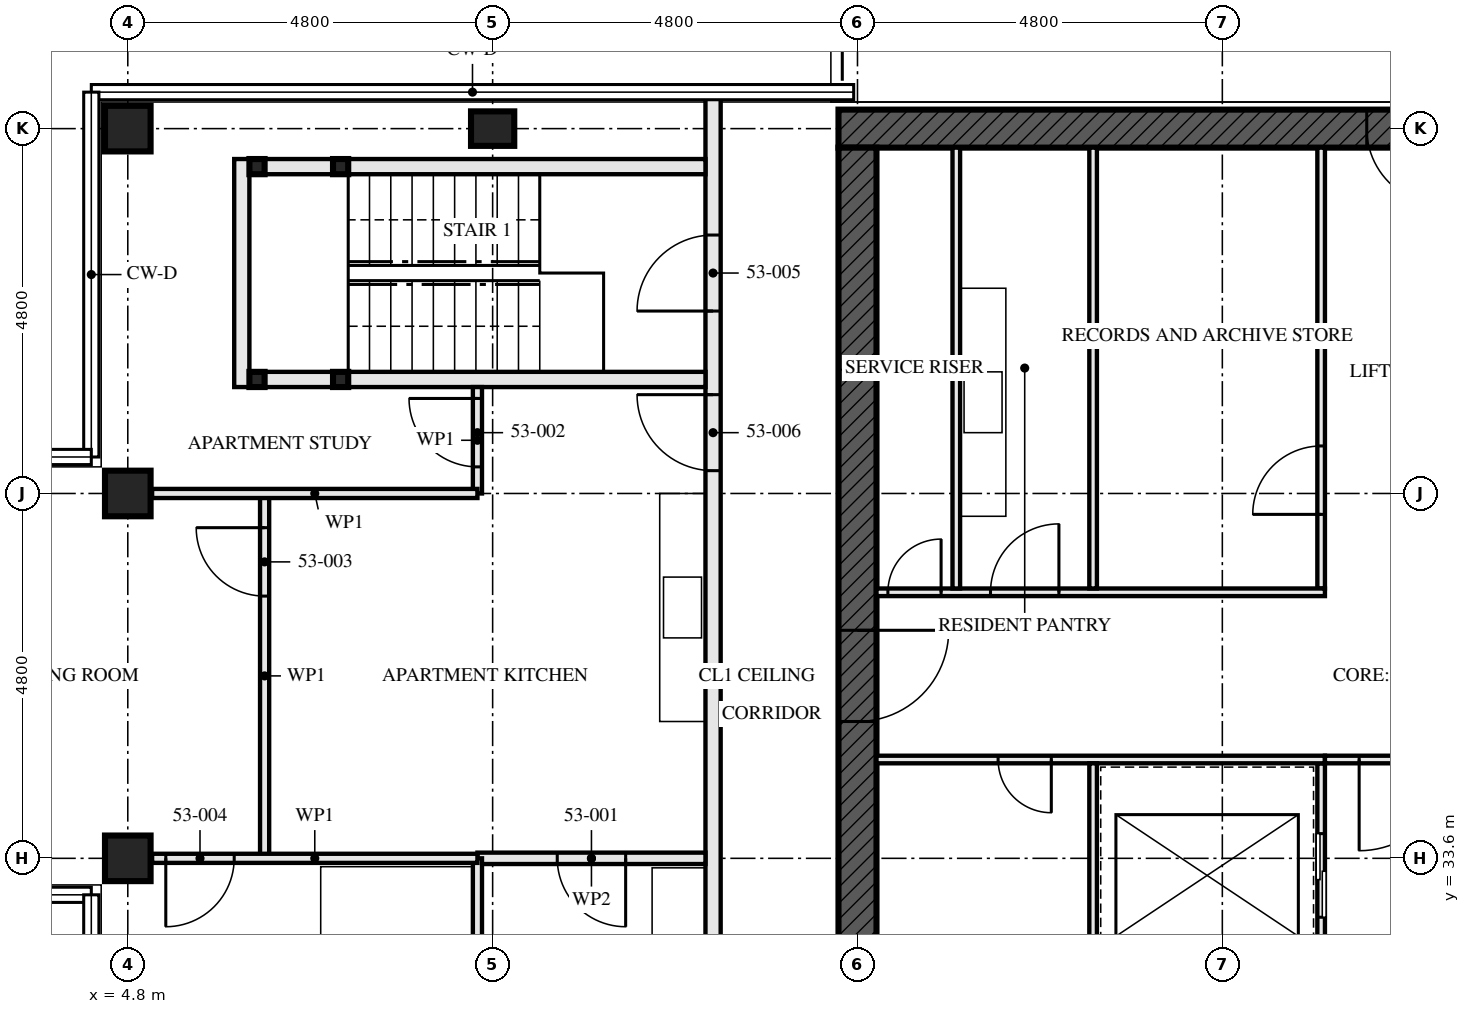
"""IFC4 building model, lengths in metres.
Left out: names, types, materials, properties, quantities, classifications, styles, units other than length and angle.
Written with IfcOpenShell. Run it as: python <this file> out.ifc"""

import sys

from ifc_helpers import new_model, si_unit, direction, frame, frame_2d, origin, origin_2d, place, context, subcontext, project, spatial, rectangle, hollow_rectangle, i_section, extrude, element, fill, save


model = new_model("IFC4")
c1 = context("Model", 3, precision=1e-05, world=origin(), true_north=direction((0.0, 1.0)))
c2 = subcontext(c1, "Body", "Model", "MODEL_VIEW")
j1 = project(units=[si_unit("LENGTHUNIT", "METRE"), si_unit("PLANEANGLEUNIT", "RADIAN")], contexts=[c1])
p1 = place(None, origin())
s1 = spatial("IfcSite", under=j1, at=p1, CompositionType="ELEMENT")
p2 = place(p1, origin())
s2 = spatial("IfcBuilding", under=s1, at=p2, CompositionType="ELEMENT")
p3 = place(p2, frame((0.0, 0.0, 194.5)))
s3 = spatial("IfcBuildingStorey", under=s2, at=p3, CompositionType="ELEMENT", Elevation=194.5)
for number, where, z_axis, x_axis in (
    (1, (4.8, 33.6, 0.0), (0.0, 0.0, 1.0), (0.0, 1.0, 0.0)),
    (2, (4.8, 38.4, 0.0), (0.0, 0.0, 1.0), (0.0, 1.0, 0.0)),
    (3, (4.8, 43.2, 0.0), (0.0, 0.0, 1.0), (0.0, 1.0, 0.0)),
):
    element("IfcColumn", number, at=place(p3, frame(where, z_axis=z_axis, x_axis=x_axis)), inside=s3, PredefinedType="COLUMN", context=c2, shape_type="SweptSolid", body=[
        extrude(hollow_rectangle(XDim=0.6, YDim=0.6, WallThickness=0.05, at=origin_2d()), origin(), (0.0, 0.0, 1.0), 3.5),
    ])
p4 = place(p3, frame((9.6, 43.2, 0.0), z_axis=(0.0, 0.0, 1.0), x_axis=(0.0, 1.0, 0.0)))
e4 = element("IfcColumn", 4, at=p4, inside=s3, PredefinedType="COLUMN", context=c2, shape_type="SweptSolid", body=[
    extrude(i_section(OverallWidth=0.454, OverallDepth=0.569, WebThickness=0.078, FlangeThickness=0.125, FilletRadius=0.015, at=origin_2d()), origin(), (0.0, 0.0, 1.0), 3.5),
])
p5 = place(p3, frame((29.05, 43.2, -0.17), z_axis=(0.0, 0.0, 1.0), x_axis=(-1.0, 0.0, 0.0)))
e5 = element("IfcWall", 5, at=p5, inside=s3, PredefinedType="SHEAR", context=c2, shape_type="SweptSolid", body=[
    extrude(rectangle(XDim=14.9, YDim=0.5, at=frame_2d((7.45, 0.0))), origin(), (0.0, 0.0, 1.0), 3.5),
])
p6 = place(p5, frame((6.95, 0.0, 0.17)))
e6 = element("IfcOpeningElement", 6, at=p6, cuts=e5, PredefinedType="OPENING", context=c2, shape_type="SweptSolid", body=[
    extrude(rectangle(XDim=1.0, YDim=2.4, at=frame_2d((0.5, 1.2))), frame((0.0, 0.26, 0.0), z_axis=(0.0, -1.0, 0.0), x_axis=(1.0, 0.0, 0.0)), (0.0, 0.0, 1.0), 0.521),
])
p7 = place(p3, frame((14.4, 42.95, -0.17), z_axis=(0.0, 0.0, 1.0), x_axis=(0.0, -1.0, 0.0)))
e7 = element("IfcWall", 7, at=p7, inside=s3, PredefinedType="SHEAR", context=c2, shape_type="SweptSolid", body=[
    extrude(rectangle(XDim=13.9, YDim=0.5, at=frame_2d((6.95, 0.0))), origin(), (0.0, 0.0, 1.0), 3.5),
])
p8 = place(p7, frame((6.35, 0.0, 0.17)))
e8 = element("IfcOpeningElement", 8, at=p8, cuts=e7, PredefinedType="OPENING", context=c2, shape_type="SweptSolid", body=[
    extrude(rectangle(XDim=1.2, YDim=2.1, at=frame_2d((0.6, 1.05))), frame((0.0, 0.26, 0.0), z_axis=(0.0, -1.0, 0.0), x_axis=(1.0, 0.0, 0.0)), (0.0, 0.0, 1.0), 0.521),
])
for number, where, z_axis, x_axis in (
    (9, (6.5, 42.7, 0.0), (0.0, 0.0, 1.0), (1.0, 0.0, 0.0)),
    (10, (6.5, 39.9, 0.0), (0.0, 0.0, 1.0), (1.0, 0.0, 0.0)),
    (11, (7.6, 42.7, 0.0), (0.0, 0.0, 1.0), (1.0, 0.0, 0.0)),
    (12, (7.6, 39.9, 0.0), (0.0, 0.0, 1.0), (1.0, 0.0, 0.0)),
):
    element("IfcColumn", number, at=place(p3, frame(where, z_axis=z_axis, x_axis=x_axis)), inside=s3, PredefinedType="COLUMN", context=c2, shape_type="SweptSolid", body=[
        extrude(hollow_rectangle(XDim=0.2, YDim=0.2, WallThickness=0.008, at=origin_2d()), origin(), (0.0, 0.0, 1.0), 3.33),
    ])
p9 = place(p3, frame((6.6, 42.7, 0.0), z_axis=(0.0, 0.0, 1.0), x_axis=(1.0, 0.0, 0.0)))
e13 = element("IfcWall", 13, at=p9, inside=s3, PredefinedType="SOLIDWALL", context=c2, shape_type="SweptSolid", body=[
    extrude(rectangle(XDim=0.9, YDim=0.2, at=frame_2d((0.45, 0.0))), origin(), (0.0, 0.0, 1.0), 2.99),
])
p10 = place(p3, frame((7.7, 42.7, 0.0), z_axis=(0.0, 0.0, 1.0), x_axis=(1.0, 0.0, 0.0)))
e14 = element("IfcWall", 14, at=p10, inside=s3, PredefinedType="SOLIDWALL", context=c2, shape_type="SweptSolid", body=[
    extrude(rectangle(XDim=4.7, YDim=0.2, at=frame_2d((2.35, 0.0))), origin(), (0.0, 0.0, 1.0), 2.99),
])
p11 = place(p3, frame((6.6, 39.9, 0.0), z_axis=(0.0, 0.0, 1.0), x_axis=(1.0, 0.0, 0.0)))
e15 = element("IfcWall", 15, at=p11, inside=s3, PredefinedType="SOLIDWALL", context=c2, shape_type="SweptSolid", body=[
    extrude(rectangle(XDim=0.9, YDim=0.2, at=frame_2d((0.45, 0.0))), origin(), (0.0, 0.0, 1.0), 2.99),
])
p12 = place(p3, frame((7.7, 39.9, 0.0), z_axis=(0.0, 0.0, 1.0), x_axis=(1.0, 0.0, 0.0)))
e16 = element("IfcWall", 16, at=p12, inside=s3, PredefinedType="SOLIDWALL", context=c2, shape_type="SweptSolid", body=[
    extrude(rectangle(XDim=4.7, YDim=0.2, at=frame_2d((2.35, 0.0))), origin(), (0.0, 0.0, 1.0), 2.99),
])
p13 = place(p3, frame((6.3, 42.8, 0.0), z_axis=(0.0, 0.0, 1.0), x_axis=(0.0, -1.0, 0.0)))
e17 = element("IfcWall", 17, at=p13, inside=s3, PredefinedType="SOLIDWALL", context=c2, shape_type="SweptSolid", body=[
    extrude(rectangle(XDim=3.0, YDim=0.2, at=frame_2d((1.5, 0.0))), origin(), (0.0, 0.0, 1.0), 3.33),
])
p14 = place(p3, frame((9.4, 33.6, 0.0), z_axis=(0.0, 0.0, 1.0), x_axis=(1.0, 0.0, 0.0)))
e18 = element("IfcWall", 18, at=p14, inside=s3, PredefinedType="PARTITIONING", context=c2, shape_type="SweptSolid", body=[
    extrude(rectangle(XDim=3.0, YDim=0.15, at=frame_2d((1.5, 0.0))), origin(), (0.0, 0.0, 1.0), 2.55),
])
p15 = place(p14, frame((1.05, 0.0, 0.0)))
e19 = element("IfcOpeningElement", 19, at=p15, cuts=e18, PredefinedType="OPENING", context=c2, shape_type="SweptSolid", body=[
    extrude(rectangle(XDim=0.9, YDim=2.1, at=frame_2d((0.45, 1.05))), frame((0.0, 0.085, 0.0), z_axis=(0.0, -1.0, 0.0), x_axis=(1.0, 0.0, 0.0)), (0.0, 0.0, 1.0), 0.171),
])
p16 = place(p3, frame((9.4, 39.8, 0.0), z_axis=(0.0, 0.0, 1.0), x_axis=(0.0, -1.0, 0.0)))
e20 = element("IfcWall", 20, at=p16, inside=s3, PredefinedType="PARTITIONING", context=c2, shape_type="SweptSolid", body=[
    extrude(rectangle(XDim=1.4, YDim=0.12, at=frame_2d((0.7, 0.0))), origin(), (0.0, 0.0, 1.0), 3.33),
])
p17 = place(p16, frame((0.15, 0.0, 0.0)))
e21 = element("IfcOpeningElement", 21, at=p17, cuts=e20, PredefinedType="OPENING", context=c2, shape_type="SweptSolid", body=[
    extrude(rectangle(XDim=0.9, YDim=2.1, at=frame_2d((0.45, 1.05))), frame((0.0, 0.071, 0.0), z_axis=(0.0, -1.0, 0.0), x_axis=(1.0, 0.0, 0.0)), (0.0, 0.0, 1.0), 0.141),
])
p18 = place(p3, frame((6.6, 38.4, 0.0), z_axis=(0.0, 0.0, 1.0), x_axis=(0.0, -1.0, 0.0)))
e22 = element("IfcWall", 22, at=p18, inside=s3, PredefinedType="PARTITIONING", context=c2, shape_type="SweptSolid", body=[
    extrude(rectangle(XDim=4.8, YDim=0.12, at=frame_2d((2.4, 0.0))), origin(), (0.0, 0.0, 1.0), 3.33),
])
p19 = place(p18, frame((0.45, 0.0, 0.0)))
e23 = element("IfcOpeningElement", 23, at=p19, cuts=e22, PredefinedType="OPENING", context=c2, shape_type="SweptSolid", body=[
    extrude(rectangle(XDim=0.9, YDim=2.1, at=frame_2d((0.45, 1.05))), frame((0.0, 0.071, 0.0), z_axis=(0.0, -1.0, 0.0), x_axis=(1.0, 0.0, 0.0)), (0.0, 0.0, 1.0), 0.141),
])
p20 = place(p3, frame((9.4, 33.6, 0.0), z_axis=(0.0, 0.0, 1.0), x_axis=(0.0, -1.0, 0.0)))
e24 = element("IfcWall", 24, at=p20, inside=s3, PredefinedType="PARTITIONING", context=c2, shape_type="SweptSolid", body=[
    extrude(rectangle(XDim=4.553, YDim=0.12, at=frame_2d((2.276, 0.0))), origin(), (0.0, 0.0, 1.0), 3.33),
])
p21 = place(p3, frame((5.12, 38.4, 0.0), z_axis=(0.0, 0.0, 1.0), x_axis=(1.0, 0.0, 0.0)))
e25 = element("IfcWall", 25, at=p21, inside=s3, PredefinedType="PARTITIONING", context=c2, shape_type="SweptSolid", body=[
    extrude(rectangle(XDim=4.28, YDim=0.12, at=frame_2d((2.14, 0.0))), origin(), (0.0, 0.0, 1.0), 2.55),
])
p22 = place(p3, frame((5.12, 33.6, 0.0), z_axis=(0.0, 0.0, 1.0), x_axis=(1.0, 0.0, 0.0)))
e26 = element("IfcWall", 26, at=p22, inside=s3, PredefinedType="PARTITIONING", context=c2, shape_type="SweptSolid", body=[
    extrude(rectangle(XDim=4.28, YDim=0.12, at=frame_2d((2.14, 0.0))), origin(), (0.0, 0.0, 1.0), 2.55),
])
p23 = place(p22, frame((0.18, 0.0, 0.0)))
e27 = element("IfcOpeningElement", 27, at=p23, cuts=e26, PredefinedType="OPENING", context=c2, shape_type="SweptSolid", body=[
    extrude(rectangle(XDim=0.9, YDim=2.1, at=frame_2d((0.45, 1.05))), frame((0.0, 0.071, 0.0), z_axis=(0.0, -1.0, 0.0), x_axis=(1.0, 0.0, 0.0)), (0.0, 0.0, 1.0), 0.141),
])
p24 = place(p3, frame((12.5, 43.655, 0.0), z_axis=(0.0, 0.0, 1.0), x_axis=(0.0, -1.0, 0.0)))
e28 = element("IfcWall", 28, at=p24, inside=s3, PredefinedType="PARTITIONING", context=c2, shape_type="SweptSolid", body=[
    extrude(rectangle(XDim=15.31, YDim=0.2, at=frame_2d((7.655, 0.0))), origin(), (0.0, 0.0, 1.0), 2.32),
])
p25 = place(p24, frame((1.855, 0.0, 0.0)))
e29 = element("IfcOpeningElement", 29, at=p25, cuts=e28, PredefinedType="OPENING", context=c2, shape_type="SweptSolid", body=[
    extrude(rectangle(XDim=1.0, YDim=2.1, at=frame_2d((0.5, 1.05))), frame((0.0, 0.111, 0.0), z_axis=(0.0, -1.0, 0.0), x_axis=(1.0, 0.0, 0.0)), (0.0, 0.0, 1.0), 0.221),
])
p26 = place(p24, frame((3.955, 0.0, 0.0)))
e30 = element("IfcOpeningElement", 30, at=p26, cuts=e28, PredefinedType="OPENING", context=c2, shape_type="SweptSolid", body=[
    extrude(rectangle(XDim=1.0, YDim=2.1, at=frame_2d((0.5, 1.05))), frame((0.0, 0.111, 0.0), z_axis=(0.0, -1.0, 0.0), x_axis=(1.0, 0.0, 0.0)), (0.0, 0.0, 1.0), 0.221),
])
p27 = place(p3, frame((15.7, 37.15, 0.0), z_axis=(0.0, 0.0, 1.0), x_axis=(0.0, 1.0, 0.0)))
e31 = element("IfcWall", 31, at=p27, inside=s3, PredefinedType="SOLIDWALL", context=c2, shape_type="SweptSolid", body=[
    extrude(rectangle(XDim=5.8, YDim=0.1, at=frame_2d((2.9, 0.0))), origin(), (0.0, 0.0, 1.0), 3.33),
])
p28 = place(p3, frame((20.5, 29.05, 0.0), z_axis=(0.0, 0.0, 1.0), x_axis=(0.0, 1.0, 0.0)))
e32 = element("IfcWall", 32, at=p28, inside=s3, PredefinedType="SOLIDWALL", context=c2, shape_type="SweptSolid", body=[
    extrude(rectangle(XDim=5.8, YDim=0.1, at=frame_2d((2.9, 0.0))), origin(), (0.0, 0.0, 1.0), 3.33),
])
p29 = place(p28, frame((0.8, 0.0, 0.0)))
e33 = element("IfcOpeningElement", 33, at=p29, cuts=e32, PredefinedType="OPENING", context=c2, shape_type="SweptSolid", body=[
    extrude(rectangle(XDim=1.1, YDim=2.3, at=frame_2d((0.55, 1.15))), frame((0.0, 0.061, 0.0), z_axis=(0.0, -1.0, 0.0), x_axis=(1.0, 0.0, 0.0)), (0.0, 0.0, 1.0), 0.121),
])
p30 = place(p28, frame((3.775, 0.0, 0.0)))
e34 = element("IfcOpeningElement", 34, at=p30, cuts=e32, PredefinedType="OPENING", context=c2, shape_type="SweptSolid", body=[
    extrude(rectangle(XDim=1.1, YDim=2.3, at=frame_2d((0.55, 1.15))), frame((0.0, 0.061, 0.0), z_axis=(0.0, -1.0, 0.0), x_axis=(1.0, 0.0, 0.0)), (0.0, 0.0, 1.0), 0.121),
])
p31 = place(p3, frame((20.5, 37.15, 0.0), z_axis=(0.0, 0.0, 1.0), x_axis=(0.0, 1.0, 0.0)))
e35 = element("IfcWall", 35, at=p31, inside=s3, PredefinedType="SOLIDWALL", context=c2, shape_type="SweptSolid", body=[
    extrude(rectangle(XDim=5.8, YDim=0.1, at=frame_2d((2.9, 0.0))), origin(), (0.0, 0.0, 1.0), 3.33),
])
p32 = place(p31, frame((0.975, 0.0, 0.0)))
e36 = element("IfcOpeningElement", 36, at=p32, cuts=e35, PredefinedType="OPENING", context=c2, shape_type="SweptSolid", body=[
    extrude(rectangle(XDim=0.9, YDim=2.1, at=frame_2d((0.45, 1.05))), frame((0.0, 0.061, 0.0), z_axis=(0.0, -1.0, 0.0), x_axis=(1.0, 0.0, 0.0)), (0.0, 0.0, 1.0), 0.121),
])
p33 = place(p3, frame((14.65, 34.9, 0.0), z_axis=(0.0, 0.0, 1.0), x_axis=(1.0, 0.0, 0.0)))
e37 = element("IfcWall", 37, at=p33, inside=s3, PredefinedType="SOLIDWALL", context=c2, shape_type="SweptSolid", body=[
    extrude(rectangle(XDim=5.9, YDim=0.1, at=frame_2d((2.95, 0.0))), origin(), (0.0, 0.0, 1.0), 3.33),
])
p34 = place(p33, frame((1.6, 0.0, 0.0)))
e38 = element("IfcOpeningElement", 38, at=p34, cuts=e37, PredefinedType="OPENING", context=c2, shape_type="SweptSolid", body=[
    extrude(rectangle(XDim=0.7, YDim=2.1, at=frame_2d((0.35, 1.05))), frame((0.0, 0.061, 0.0), z_axis=(0.0, -1.0, 0.0), x_axis=(1.0, 0.0, 0.0)), (0.0, 0.0, 1.0), 0.121),
])
p35 = place(p3, frame((14.65, 37.1, 0.0), z_axis=(0.0, 0.0, 1.0), x_axis=(1.0, 0.0, 0.0)))
e39 = element("IfcWall", 39, at=p35, inside=s3, PredefinedType="SOLIDWALL", context=c2, shape_type="SweptSolid", body=[
    extrude(rectangle(XDim=5.9, YDim=0.1, at=frame_2d((2.95, 0.0))), origin(), (0.0, 0.0, 1.0), 3.33),
])
p36 = place(p35, frame((0.15, 0.0, 0.0)))
e40 = element("IfcOpeningElement", 40, at=p36, cuts=e39, PredefinedType="OPENING", context=c2, shape_type="SweptSolid", body=[
    extrude(rectangle(XDim=0.7, YDim=2.1, at=frame_2d((0.35, 1.05))), frame((0.0, 0.061, 0.0), z_axis=(0.0, -1.0, 0.0), x_axis=(1.0, 0.0, 0.0)), (0.0, 0.0, 1.0), 0.121),
])
p37 = place(p35, frame((1.5, 0.0, 0.0)))
e41 = element("IfcOpeningElement", 41, at=p37, cuts=e39, PredefinedType="OPENING", context=c2, shape_type="SweptSolid", body=[
    extrude(rectangle(XDim=0.9, YDim=2.1, at=frame_2d((0.45, 1.05))), frame((0.0, 0.061, 0.0), z_axis=(0.0, -1.0, 0.0), x_axis=(1.0, 0.0, 0.0)), (0.0, 0.0, 1.0), 0.121),
])
p38 = place(p3, frame((20.55, 34.9, 0.0), z_axis=(0.0, 0.0, 1.0), x_axis=(1.0, 0.0, 0.0)))
e42 = element("IfcWall", 42, at=p38, inside=s3, PredefinedType="SOLIDWALL", context=c2, shape_type="SweptSolid", body=[
    extrude(rectangle(XDim=2.5, YDim=0.1, at=frame_2d((1.25, 0.0))), origin(), (0.0, 0.0, 1.0), 3.33),
])
p39 = place(p38, frame((0.45, 0.0, 0.0)))
e43 = element("IfcOpeningElement", 43, at=p39, cuts=e42, PredefinedType="OPENING", context=c2, shape_type="SweptSolid", body=[
    extrude(rectangle(XDim=1.2, YDim=2.1, at=frame_2d((0.6, 1.05))), frame((0.0, 0.061, 0.0), z_axis=(0.0, -1.0, 0.0), x_axis=(1.0, 0.0, 0.0)), (0.0, 0.0, 1.0), 0.121),
])
for number, where, z_axis, x_axis in (
    (44, (17.5, 29.05, 0.0), (0.0, 0.0, 1.0), (0.0, 1.0, 0.0)),
    (45, (17.5, 37.15, 0.0), (0.0, 0.0, 1.0), (0.0, 1.0, 0.0)),
):
    element("IfcWall", number, at=place(p3, frame(where, z_axis=z_axis, x_axis=x_axis)), inside=s3, PredefinedType="SOLIDWALL", context=c2, shape_type="SweptSolid", body=[
        extrude(rectangle(XDim=5.8, YDim=0.1, at=frame_2d((2.9, 0.0))), origin(), (0.0, 0.0, 1.0), 3.33),
    ])
p40 = place(p15, frame((0.9, 0.0, 0.0), z_axis=(0.0, 0.0, 1.0), x_axis=(-1.0, 0.0, 0.0)))
e46 = element("IfcDoor", 46, at=p40, inside=s3, OperationType="SINGLE_SWING_RIGHT", PredefinedType="DOOR", context=c2, shape_type="SweptSolid", body=[
    extrude(rectangle(XDim=0.9, YDim=2.1, at=frame_2d((0.45, 1.05))), frame((0.0, 0.022, 0.0), z_axis=(0.0, -1.0, 0.0), x_axis=(1.0, 0.0, 0.0)), (0.0, 0.0, 1.0), 0.044),
])
fill(e19, e46)
p41 = place(p17, frame((0.9, 0.0, 0.0), z_axis=(0.0, 0.0, 1.0), x_axis=(-1.0, 0.0, 0.0)))
e47 = element("IfcDoor", 47, at=p41, inside=s3, OperationType="SINGLE_SWING_LEFT", PredefinedType="DOOR", context=c2, shape_type="SweptSolid", body=[
    extrude(rectangle(XDim=0.9, YDim=2.1, at=frame_2d((0.45, 1.05))), frame((0.0, 0.022, 0.0), z_axis=(0.0, -1.0, 0.0), x_axis=(1.0, 0.0, 0.0)), (0.0, 0.0, 1.0), 0.044),
])
fill(e21, e47)
p42 = place(p19, frame((0.9, 0.0, 0.0), z_axis=(0.0, 0.0, 1.0), x_axis=(-1.0, 0.0, 0.0)))
e48 = element("IfcDoor", 48, at=p42, inside=s3, OperationType="SINGLE_SWING_LEFT", PredefinedType="DOOR", context=c2, shape_type="SweptSolid", body=[
    extrude(rectangle(XDim=0.9, YDim=2.1, at=frame_2d((0.45, 1.05))), frame((0.0, 0.022, 0.0), z_axis=(0.0, -1.0, 0.0), x_axis=(1.0, 0.0, 0.0)), (0.0, 0.0, 1.0), 0.044),
])
fill(e23, e48)
p43 = place(p23, frame((0.9, 0.0, 0.0), z_axis=(0.0, 0.0, 1.0), x_axis=(-1.0, 0.0, 0.0)))
e49 = element("IfcDoor", 49, at=p43, inside=s3, OperationType="SINGLE_SWING_LEFT", PredefinedType="DOOR", context=c2, shape_type="SweptSolid", body=[
    extrude(rectangle(XDim=0.9, YDim=2.1, at=frame_2d((0.45, 1.05))), frame((0.0, 0.022, 0.0), z_axis=(0.0, -1.0, 0.0), x_axis=(1.0, 0.0, 0.0)), (0.0, 0.0, 1.0), 0.044),
])
fill(e27, e49)
p44 = place(p25, frame((1.0, 0.0, 0.0), z_axis=(0.0, 0.0, 1.0), x_axis=(-1.0, 0.0, 0.0)))
e50 = element("IfcDoor", 50, at=p44, inside=s3, OperationType="SINGLE_SWING_RIGHT", PredefinedType="DOOR", context=c2, shape_type="SweptSolid", body=[
    extrude(rectangle(XDim=1.0, YDim=2.1, at=frame_2d((0.5, 1.05))), frame((0.0, 0.032, 0.0), z_axis=(0.0, -1.0, 0.0), x_axis=(1.0, 0.0, 0.0)), (0.0, 0.0, 1.0), 0.064),
])
fill(e29, e50)
p45 = place(p26, frame((1.0, 0.0, 0.0), z_axis=(0.0, 0.0, 1.0), x_axis=(-1.0, 0.0, 0.0)))
e51 = element("IfcDoor", 51, at=p45, inside=s3, OperationType="SINGLE_SWING_LEFT", PredefinedType="DOOR", context=c2, shape_type="SweptSolid", body=[
    extrude(rectangle(XDim=1.0, YDim=2.1, at=frame_2d((0.5, 1.05))), frame((0.0, 0.027, 0.0), z_axis=(0.0, -1.0, 0.0), x_axis=(1.0, 0.0, 0.0)), (0.0, 0.0, 1.0), 0.054),
])
fill(e30, e51)
p46 = place(p30, origin())
e52 = element("IfcDoor", 52, at=p46, inside=s3, OperationType="SLIDING_TO_LEFT", PredefinedType="DOOR", context=c2, shape_type="SweptSolid", body=[
    extrude(rectangle(XDim=1.1, YDim=2.3, at=frame_2d((0.55, 1.15))), frame((0.0, 0.05, 0.0), z_axis=(0.0, -1.0, 0.0), x_axis=(1.0, 0.0, 0.0)), (0.0, 0.0, 1.0), 0.1),
])
fill(e34, e52)
p47 = place(p32, origin())
e53 = element("IfcDoor", 53, at=p47, inside=s3, OperationType="SINGLE_SWING_RIGHT", PredefinedType="DOOR", context=c2, shape_type="SweptSolid", body=[
    extrude(rectangle(XDim=0.9, YDim=2.1, at=frame_2d((0.45, 1.05))), frame((0.0, 0.027, 0.0), z_axis=(0.0, -1.0, 0.0), x_axis=(1.0, 0.0, 0.0)), (0.0, 0.0, 1.0), 0.054),
])
fill(e36, e53)
p48 = place(p34, frame((0.7, 0.0, 0.0), z_axis=(0.0, 0.0, 1.0), x_axis=(-1.0, 0.0, 0.0)))
e54 = element("IfcDoor", 54, at=p48, inside=s3, OperationType="SINGLE_SWING_RIGHT", PredefinedType="DOOR", context=c2, shape_type="SweptSolid", body=[
    extrude(rectangle(XDim=0.7, YDim=2.1, at=frame_2d((0.35, 1.05))), frame((0.0, 0.027, 0.0), z_axis=(0.0, -1.0, 0.0), x_axis=(1.0, 0.0, 0.0)), (0.0, 0.0, 1.0), 0.054),
])
fill(e38, e54)
p49 = place(p36, origin())
e55 = element("IfcDoor", 55, at=p49, inside=s3, OperationType="SINGLE_SWING_LEFT", PredefinedType="DOOR", context=c2, shape_type="SweptSolid", body=[
    extrude(rectangle(XDim=0.7, YDim=2.1, at=frame_2d((0.35, 1.05))), frame((0.0, 0.027, 0.0), z_axis=(0.0, -1.0, 0.0), x_axis=(1.0, 0.0, 0.0)), (0.0, 0.0, 1.0), 0.054),
])
fill(e40, e55)
p50 = place(p37, origin())
e56 = element("IfcDoor", 56, at=p50, inside=s3, OperationType="SINGLE_SWING_LEFT", PredefinedType="DOOR", context=c2, shape_type="SweptSolid", body=[
    extrude(rectangle(XDim=0.9, YDim=2.1, at=frame_2d((0.45, 1.05))), frame((0.0, 0.027, 0.0), z_axis=(0.0, -1.0, 0.0), x_axis=(1.0, 0.0, 0.0)), (0.0, 0.0, 1.0), 0.054),
])
fill(e41, e56)
p51 = place(p39, frame((1.2, 0.0, 0.0), z_axis=(0.0, 0.0, 1.0), x_axis=(-1.0, 0.0, 0.0)))
e57 = element("IfcDoor", 57, at=p51, inside=s3, OperationType="SINGLE_SWING_LEFT", PredefinedType="DOOR", context=c2, shape_type="SweptSolid", body=[
    extrude(rectangle(XDim=1.2, YDim=2.1, at=frame_2d((0.6, 1.05))), frame((0.0, 0.027, 0.0), z_axis=(0.0, -1.0, 0.0), x_axis=(1.0, 0.0, 0.0)), (0.0, 0.0, 1.0), 0.054),
])
fill(e43, e57)
p52 = place(p8, origin())
e58 = element("IfcDoor", 58, at=p52, inside=s3, OperationType="SINGLE_SWING_LEFT", PredefinedType="DOOR", context=c2, shape_type="SweptSolid", body=[
    extrude(rectangle(XDim=1.2, YDim=2.1, at=frame_2d((0.6, 1.05))), frame((0.0, 0.027, 0.0), z_axis=(0.0, -1.0, 0.0), x_axis=(1.0, 0.0, 0.0)), (0.0, 0.0, 1.0), 0.054),
])
fill(e8, e58)
p53 = place(p6, origin())
e59 = element("IfcDoor", 59, at=p53, inside=s3, OperationType="SINGLE_SWING_LEFT", PredefinedType="DOOR", context=c2, shape_type="SweptSolid", body=[
    extrude(rectangle(XDim=1.0, YDim=2.4, at=frame_2d((0.5, 1.2))), frame((0.0, 0.035, 0.0), z_axis=(0.0, -1.0, 0.0), x_axis=(1.0, 0.0, 0.0)), (0.0, 0.0, 1.0), 0.07),
])
fill(e6, e59)
save(model, sys.argv[1])
